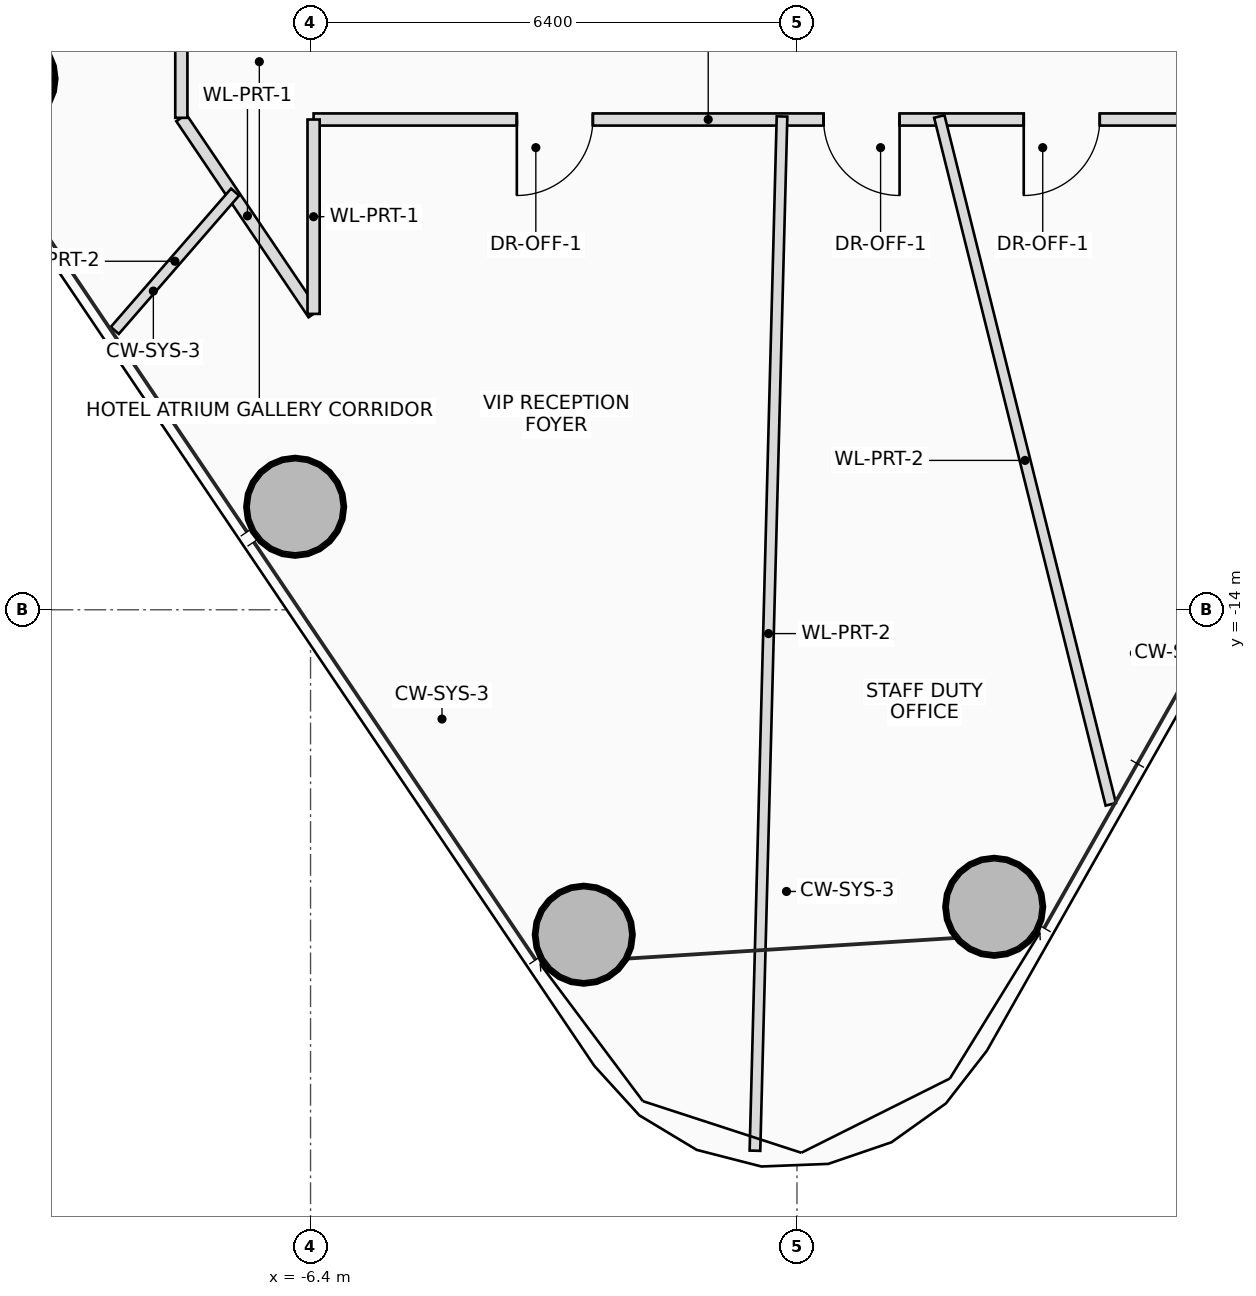
"""IFC4 building model, lengths in metres.
Left out: names, types, materials, properties, quantities, classifications, styles, units other than length and angle.
Written with IfcOpenShell. Run it as: python <this file> out.ifc"""

import sys

from ifc_helpers import new_model, si_unit, direction, frame, frame_2d, origin, origin_2d, place, context, subcontext, project, spatial, rectangle, hollow_circle, extrude, source, transform, mapped, element, fill, save


model = new_model("IFC4")
c1 = context("Model", 3, precision=1e-05, world=origin(), true_north=direction((0.0, 1.0)))
c2 = subcontext(c1, "Body", "Model", "MODEL_VIEW")
j1 = project(units=[si_unit("LENGTHUNIT", "METRE"), si_unit("PLANEANGLEUNIT", "RADIAN")], contexts=[c1])
p1 = place(None, origin())
s1 = spatial("IfcSite", under=j1, at=p1, CompositionType="ELEMENT")
p2 = place(p1, origin())
s2 = spatial("IfcBuilding", under=s1, at=p2, CompositionType="ELEMENT")
p3 = place(p2, frame((0.0, 0.0, 176.0)))
s3 = spatial("IfcBuildingStorey", under=s2, at=p3, CompositionType="ELEMENT", Elevation=176.0)
m1 = source(origin(), c2, "Body", "SweptSolid", [
    extrude(hollow_circle(Radius=0.65, WallThickness=0.045, at=origin_2d()), origin(), (0.0, 0.0, 1.0), 3.45),
])
for number, where, z_axis, x_axis in (
    (1, (2.595, -17.908, 0.0), (0.0, 0.0, 1.0), (1.0, 0.0, 0.0)),
    (2, (-10.4, -7.015, 0.0), (0.0, 0.0, 1.0), (1.0, 0.0, 0.0)),
    (3, (-6.603, -12.645, 0.0), (0.0, 0.0, 1.0), (1.0, 0.0, 0.0)),
    (4, (-2.805, -18.275, 0.0), (0.0, 0.0, 1.0), (1.0, 0.0, 0.0)),
):
    element("IfcColumn", number, at=place(p3, frame(where, z_axis=z_axis, x_axis=x_axis)), inside=s3, PredefinedType="COLUMN", context=c2, shape_type="MappedRepresentation", body=[
        mapped(m1, transform((0.0, 0.0, 0.0), scale=1.0)),
    ])
p4 = place(p3, frame((-6.36, -10.107, 0.0), z_axis=(0.0, 0.0, 1.0), x_axis=(-0.559200615657, 0.829032370567, 0.0)))
e5 = element("IfcWall", 5, at=p4, inside=s3, PredefinedType="PARTITIONING", context=c2, shape_type="SweptSolid", body=[
    extrude(rectangle(XDim=3.112, YDim=0.16, at=frame_2d((1.556, 0.0))), origin(), (0.0, 0.0, 1.0), 2.605),
])
p5 = place(p3, frame((-8.1, -7.528, 0.0), z_axis=(0.0, 0.0, 1.0), x_axis=(0.0, 1.0, 0.0)))
e6 = element("IfcWall", 6, at=p5, inside=s3, PredefinedType="PARTITIONING", context=c2, shape_type="SweptSolid", body=[
    extrude(rectangle(XDim=15.078, YDim=0.16, at=frame_2d((7.539, 0.0))), origin(), (0.0, 0.0, 1.0), 2.605),
])
p6 = place(p5, frame((3.265, 0.0, 0.0)))
e7 = element("IfcOpeningElement", 7, at=p6, cuts=e6, PredefinedType="OPENING", context=c2, shape_type="SweptSolid", body=[
    extrude(rectangle(XDim=0.9, YDim=2.05, at=frame_2d((0.45, 1.025))), frame((0.0, 0.09, 0.0), z_axis=(0.0, -1.0, 0.0), x_axis=(1.0, 0.0, 0.0)), (0.0, 0.0, 1.0), 0.18),
])
p7 = place(p5, frame((9.079, 0.0, 0.0)))
e8 = element("IfcOpeningElement", 8, at=p7, cuts=e6, PredefinedType="OPENING", context=c2, shape_type="SweptSolid", body=[
    extrude(rectangle(XDim=1.05, YDim=2.2, at=frame_2d((0.525, 1.1))), frame((0.0, 0.09, 0.0), z_axis=(0.0, -1.0, 0.0), x_axis=(1.0, 0.0, 0.0)), (0.0, 0.0, 1.0), 0.18),
])
p8 = place(p5, frame((12.91, 0.0, 0.0)))
e9 = element("IfcOpeningElement", 9, at=p8, cuts=e6, PredefinedType="OPENING", context=c2, shape_type="SweptSolid", body=[
    extrude(rectangle(XDim=1.05, YDim=2.2, at=frame_2d((0.525, 1.1))), frame((0.0, 0.09, 0.0), z_axis=(0.0, -1.0, 0.0), x_axis=(1.0, 0.0, 0.0)), (0.0, 0.0, 1.0), 0.18),
])
p9 = place(p3, frame((5.25, -7.55, 0.0), z_axis=(0.0, 0.0, 1.0), x_axis=(-1.0, 0.0, 0.0)))
e10 = element("IfcWall", 10, at=p9, inside=s3, PredefinedType="PARTITIONING", context=c2, shape_type="SweptSolid", body=[
    extrude(rectangle(XDim=11.61, YDim=0.16, at=frame_2d((5.805, 0.0))), origin(), (0.0, 0.0, 1.0), 2.605),
])
p10 = place(p9, frame((1.267, 0.0, 0.0)))
e11 = element("IfcOpeningElement", 11, at=p10, cuts=e10, PredefinedType="OPENING", context=c2, shape_type="SweptSolid", body=[
    extrude(rectangle(XDim=1.0, YDim=2.25, at=frame_2d((0.5, 1.125))), frame((0.0, 0.09, 0.0), z_axis=(0.0, -1.0, 0.0), x_axis=(1.0, 0.0, 0.0)), (0.0, 0.0, 1.0), 0.18),
])
p11 = place(p9, frame((3.9, 0.0, 0.0)))
e12 = element("IfcOpeningElement", 12, at=p11, cuts=e10, PredefinedType="OPENING", context=c2, shape_type="SweptSolid", body=[
    extrude(rectangle(XDim=1.0, YDim=2.25, at=frame_2d((0.5, 1.125))), frame((0.0, 0.09, 0.0), z_axis=(0.0, -1.0, 0.0), x_axis=(1.0, 0.0, 0.0)), (0.0, 0.0, 1.0), 0.18),
])
p12 = place(p9, frame((7.936, 0.0, 0.0)))
e13 = element("IfcOpeningElement", 13, at=p12, cuts=e10, PredefinedType="OPENING", context=c2, shape_type="SweptSolid", body=[
    extrude(rectangle(XDim=1.0, YDim=2.25, at=frame_2d((0.5, 1.125))), frame((0.0, 0.09, 0.0), z_axis=(0.0, -1.0, 0.0), x_axis=(1.0, 0.0, 0.0)), (0.0, 0.0, 1.0), 0.18),
])
p13 = place(p3, frame((-6.36, -7.55, 0.0), z_axis=(0.0, 0.0, 1.0), x_axis=(0.0, -1.0, 0.0)))
e14 = element("IfcWall", 14, at=p13, inside=s3, PredefinedType="PARTITIONING", context=c2, shape_type="SweptSolid", body=[
    extrude(rectangle(XDim=2.557, YDim=0.16, at=frame_2d((1.279, 0.0))), origin(), (0.0, 0.0, 1.0), 2.605),
])
p14 = place(p3, frame((-7.393, -8.505, 0.0), z_axis=(0.0, 0.0, 1.0), x_axis=(-0.656043394523, -0.754723170774, 0.0)))
e15 = element("IfcWall", 15, at=p14, inside=s3, PredefinedType="PARTITIONING", context=c2, shape_type="SweptSolid", body=[
    extrude(rectangle(XDim=2.412, YDim=0.14, at=frame_2d((1.206, 0.0))), origin(), (0.0, 0.0, 1.0), 2.765),
])
p15 = place(p3, frame((-0.197, -7.51, 0.0), z_axis=(0.0, 0.0, 1.0), x_axis=(-0.026169420715, -0.999657522064, 0.0)))
e16 = element("IfcWall", 16, at=p15, inside=s3, PredefinedType="PARTITIONING", context=c2, shape_type="SweptSolid", body=[
    extrude(rectangle(XDim=13.611, YDim=0.14, at=frame_2d((6.806, 0.0))), origin(), (0.0, 0.0, 1.0), 2.765),
])
p16 = place(p3, frame((1.873, -7.51, 0.0), z_axis=(0.0, 0.0, 1.0), x_axis=(0.241919667538, -0.970296281791, 0.0)))
e17 = element("IfcWall", 17, at=p16, inside=s3, PredefinedType="PARTITIONING", context=c2, shape_type="SweptSolid", body=[
    extrude(rectangle(XDim=9.327, YDim=0.14, at=frame_2d((4.664, 0.0))), origin(), (0.0, 0.0, 1.0), 2.605),
])
p17 = place(p10, origin())
e18 = element("IfcDoor", 18, at=p17, inside=s3, OperationType="SINGLE_SWING_RIGHT", PredefinedType="DOOR", context=c2, shape_type="SweptSolid", body=[
    extrude(rectangle(XDim=1.0, YDim=2.25, at=frame_2d((0.5, 1.125))), frame((0.0, 0.025, 0.0), z_axis=(0.0, -1.0, 0.0), x_axis=(1.0, 0.0, 0.0)), (0.0, 0.0, 1.0), 0.05),
])
fill(e11, e18)
p18 = place(p11, origin())
e19 = element("IfcDoor", 19, at=p18, inside=s3, OperationType="SINGLE_SWING_LEFT", PredefinedType="DOOR", context=c2, shape_type="SweptSolid", body=[
    extrude(rectangle(XDim=1.0, YDim=2.25, at=frame_2d((0.5, 1.125))), frame((0.0, 0.025, 0.0), z_axis=(0.0, -1.0, 0.0), x_axis=(1.0, 0.0, 0.0)), (0.0, 0.0, 1.0), 0.05),
])
fill(e12, e19)
p19 = place(p12, origin())
e20 = element("IfcDoor", 20, at=p19, inside=s3, OperationType="SINGLE_SWING_RIGHT", PredefinedType="DOOR", context=c2, shape_type="SweptSolid", body=[
    extrude(rectangle(XDim=1.0, YDim=2.25, at=frame_2d((0.5, 1.125))), frame((0.0, 0.025, 0.0), z_axis=(0.0, -1.0, 0.0), x_axis=(1.0, 0.0, 0.0)), (0.0, 0.0, 1.0), 0.05),
])
fill(e13, e20)
save(model, sys.argv[1])
